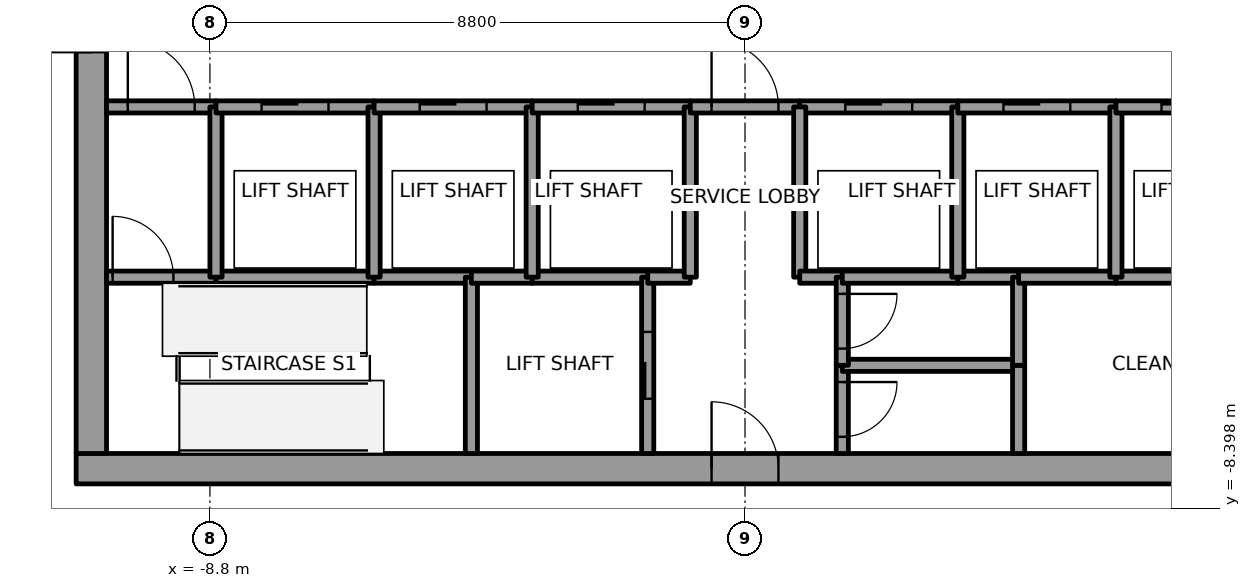
"""IFC4 building model, lengths in metres.
Left out: names, types, materials, properties, quantities, classifications, styles, units other than length and angle.
Written with IfcOpenShell. Run it as: python <this file> out.ifc"""

import sys

from ifc_helpers import new_model, si_unit, direction, frame, frame_2d, origin, place, context, subcontext, project, spatial, rectangle, extrude, element, fill, save


model = new_model("IFC4")
c1 = context("Model", 3, precision=1e-05, world=origin(), true_north=direction((0.0, 1.0)))
c2 = subcontext(c1, "Body", "Model", "MODEL_VIEW")
j1 = project(units=[si_unit("LENGTHUNIT", "METRE"), si_unit("PLANEANGLEUNIT", "RADIAN")], contexts=[c1])
p1 = place(None, origin())
s1 = spatial("IfcSite", under=j1, at=p1, CompositionType="ELEMENT")
p2 = place(p1, origin())
s2 = spatial("IfcBuilding", under=s1, at=p2, CompositionType="ELEMENT")
p3 = place(p2, frame((0.0, 0.0, 243.0)))
s3 = spatial("IfcBuildingStorey", under=s2, at=p3, CompositionType="ELEMENT", Elevation=243.0)
p4 = place(p3, frame((-11.0, -7.75, 0.0), z_axis=(0.0, 0.0, 1.0), x_axis=(1.0, 0.0, 0.0)))
e1 = element("IfcWall", 1, at=p4, inside=s3, PredefinedType="SHEAR", context=c2, shape_type="SweptSolid", body=[
    extrude(rectangle(XDim=22.0, YDim=0.5, at=frame_2d((11.0, 0.0))), origin(), (0.0, 0.0, 1.0), 4.0),
])
p5 = place(p4, frame((10.45, 0.0, 0.0)))
e2 = element("IfcOpeningElement", 2, at=p5, cuts=e1, PredefinedType="OPENING", context=c2, shape_type="SweptSolid", body=[
    extrude(rectangle(XDim=1.1, YDim=2.1, at=frame_2d((0.55, 1.05))), frame((0.0, 0.25, 0.0), z_axis=(0.0, -1.0, 0.0), x_axis=(1.0, 0.0, 0.0)), (0.0, 0.0, 1.0), 0.5),
])
p6 = place(p3, frame((-10.75, -7.5, 0.0), z_axis=(0.0, 0.0, 1.0), x_axis=(0.0, 1.0, 0.0)))
e3 = element("IfcWall", 3, at=p6, inside=s3, PredefinedType="SHEAR", context=c2, shape_type="SweptSolid", body=[
    extrude(rectangle(XDim=15.0, YDim=0.5, at=frame_2d((7.5, 0.0))), origin(), (0.0, 0.0, 1.0), 4.0),
])
p7 = place(p6, frame((6.6, 0.0, 0.0)))
e4 = element("IfcOpeningElement", 4, at=p7, cuts=e3, PredefinedType="OPENING", context=c2, shape_type="SweptSolid", body=[
    extrude(rectangle(XDim=1.8, YDim=2.1, at=frame_2d((0.9, 1.05))), frame((0.0, 0.25, 0.0), z_axis=(0.0, -1.0, 0.0), x_axis=(1.0, 0.0, 0.0)), (0.0, 0.0, 1.0), 0.5),
])
p8 = place(p3, frame((-10.5, -4.6, 0.0), z_axis=(0.0, 0.0, 1.0), x_axis=(1.0, 0.0, 0.0)))
e5 = element("IfcWall", 5, at=p8, inside=s3, PredefinedType="SOLIDWALL", context=c2, shape_type="SweptSolid", body=[
    extrude(rectangle(XDim=1.8, YDim=0.2, at=frame_2d((0.9, 0.0))), origin(), (0.0, 0.0, 1.0), 3.85),
])
p9 = place(p8, frame((0.1, 0.0, 0.0)))
e6 = element("IfcOpeningElement", 6, at=p9, cuts=e5, PredefinedType="OPENING", context=c2, shape_type="SweptSolid", body=[
    extrude(rectangle(XDim=1.0, YDim=2.1, at=frame_2d((0.5, 1.05))), frame((0.0, 0.1, 0.0), z_axis=(0.0, -1.0, 0.0), x_axis=(1.0, 0.0, 0.0)), (0.0, 0.0, 1.0), 0.2),
])
p10 = place(p3, frame((-10.5, -1.8, 0.0), z_axis=(0.0, 0.0, 1.0), x_axis=(1.0, 0.0, 0.0)))
e7 = element("IfcWall", 7, at=p10, inside=s3, PredefinedType="SOLIDWALL", context=c2, shape_type="SweptSolid", body=[
    extrude(rectangle(XDim=1.8, YDim=0.2, at=frame_2d((0.9, 0.0))), origin(), (0.0, 0.0, 1.0), 3.85),
])
p11 = place(p10, frame((0.35, 0.0, 0.0)))
e8 = element("IfcOpeningElement", 8, at=p11, cuts=e7, PredefinedType="OPENING", context=c2, shape_type="SweptSolid", body=[
    extrude(rectangle(XDim=1.1, YDim=2.1, at=frame_2d((0.55, 1.05))), frame((0.0, 0.1, 0.0), z_axis=(0.0, -1.0, 0.0), x_axis=(1.0, 0.0, 0.0)), (0.0, 0.0, 1.0), 0.2),
])
p12 = place(p3, frame((-8.7, -4.6, 0.0), z_axis=(0.0, 0.0, 1.0), x_axis=(1.0, 0.0, 0.0)))
e9 = element("IfcWall", 9, at=p12, inside=s3, PredefinedType="SOLIDWALL", context=c2, shape_type="SweptSolid", body=[
    extrude(rectangle(XDim=2.6, YDim=0.2, at=frame_2d((1.3, 0.0))), origin(), (0.0, 0.0, 1.0), 3.85),
])
p13 = place(p3, frame((-8.7, -4.6, 0.0), z_axis=(0.0, 0.0, 1.0), x_axis=(0.0, 1.0, 0.0)))
e10 = element("IfcWall", 10, at=p13, inside=s3, PredefinedType="SOLIDWALL", context=c2, shape_type="SweptSolid", body=[
    extrude(rectangle(XDim=2.8, YDim=0.2, at=frame_2d((1.4, 0.0))), origin(), (0.0, 0.0, 1.0), 3.85),
])
p14 = place(p3, frame((-8.7, -1.8, 0.0), z_axis=(0.0, 0.0, 1.0), x_axis=(1.0, 0.0, 0.0)))
e11 = element("IfcWall", 11, at=p14, inside=s3, PredefinedType="SOLIDWALL", context=c2, shape_type="SweptSolid", body=[
    extrude(rectangle(XDim=2.6, YDim=0.2, at=frame_2d((1.3, 0.0))), origin(), (0.0, 0.0, 1.0), 3.85),
])
p15 = place(p14, frame((0.75, 0.0, 0.0)))
e12 = element("IfcOpeningElement", 12, at=p15, cuts=e11, PredefinedType="OPENING", context=c2, shape_type="SweptSolid", body=[
    extrude(rectangle(XDim=1.1, YDim=2.1, at=frame_2d((0.55, 1.05))), frame((0.0, 0.1, 0.0), z_axis=(0.0, -1.0, 0.0), x_axis=(1.0, 0.0, 0.0)), (0.0, 0.0, 1.0), 0.2),
])
p16 = place(p3, frame((-6.1, -4.6, 0.0), z_axis=(0.0, 0.0, 1.0), x_axis=(1.0, 0.0, 0.0)))
e13 = element("IfcWall", 13, at=p16, inside=s3, PredefinedType="SOLIDWALL", context=c2, shape_type="SweptSolid", body=[
    extrude(rectangle(XDim=1.6, YDim=0.2, at=frame_2d((0.8, 0.0))), origin(), (0.0, 0.0, 1.0), 3.85),
])
p17 = place(p3, frame((-6.1, -4.6, 0.0), z_axis=(0.0, 0.0, 1.0), x_axis=(0.0, 1.0, 0.0)))
e14 = element("IfcWall", 14, at=p17, inside=s3, PredefinedType="SOLIDWALL", context=c2, shape_type="SweptSolid", body=[
    extrude(rectangle(XDim=2.8, YDim=0.2, at=frame_2d((1.4, 0.0))), origin(), (0.0, 0.0, 1.0), 3.85),
])
p18 = place(p3, frame((-6.1, -1.8, 0.0), z_axis=(0.0, 0.0, 1.0), x_axis=(1.0, 0.0, 0.0)))
e15 = element("IfcWall", 15, at=p18, inside=s3, PredefinedType="SOLIDWALL", context=c2, shape_type="SweptSolid", body=[
    extrude(rectangle(XDim=2.6, YDim=0.2, at=frame_2d((1.3, 0.0))), origin(), (0.0, 0.0, 1.0), 3.85),
])
p19 = place(p18, frame((0.75, 0.0, 0.0)))
e16 = element("IfcOpeningElement", 16, at=p19, cuts=e15, PredefinedType="OPENING", context=c2, shape_type="SweptSolid", body=[
    extrude(rectangle(XDim=1.1, YDim=2.1, at=frame_2d((0.55, 1.05))), frame((0.0, 0.1, 0.0), z_axis=(0.0, -1.0, 0.0), x_axis=(1.0, 0.0, 0.0)), (0.0, 0.0, 1.0), 0.2),
])
p20 = place(p3, frame((-4.5, -4.6, 0.0), z_axis=(0.0, 0.0, 1.0), x_axis=(0.0, -1.0, 0.0)))
e17 = element("IfcWall", 17, at=p20, inside=s3, PredefinedType="SOLIDWALL", context=c2, shape_type="SweptSolid", body=[
    extrude(rectangle(XDim=2.9, YDim=0.2, at=frame_2d((1.45, 0.0))), origin(), (0.0, 0.0, 1.0), 3.85),
])
p21 = place(p3, frame((-4.5, -4.6, 0.0), z_axis=(0.0, 0.0, 1.0), x_axis=(1.0, 0.0, 0.0)))
e18 = element("IfcWall", 18, at=p21, inside=s3, PredefinedType="SOLIDWALL", context=c2, shape_type="SweptSolid", body=[
    extrude(rectangle(XDim=1.0, YDim=0.2, at=frame_2d((0.5, 0.0))), origin(), (0.0, 0.0, 1.0), 3.85),
])
p22 = place(p3, frame((-3.5, -4.6, 0.0), z_axis=(0.0, 0.0, 1.0), x_axis=(1.0, 0.0, 0.0)))
e19 = element("IfcWall", 19, at=p22, inside=s3, PredefinedType="SOLIDWALL", context=c2, shape_type="SweptSolid", body=[
    extrude(rectangle(XDim=1.9, YDim=0.2, at=frame_2d((0.95, 0.0))), origin(), (0.0, 0.0, 1.0), 3.85),
])
p23 = place(p3, frame((-3.5, -4.6, 0.0), z_axis=(0.0, 0.0, 1.0), x_axis=(0.0, 1.0, 0.0)))
e20 = element("IfcWall", 20, at=p23, inside=s3, PredefinedType="SOLIDWALL", context=c2, shape_type="SweptSolid", body=[
    extrude(rectangle(XDim=2.8, YDim=0.2, at=frame_2d((1.4, 0.0))), origin(), (0.0, 0.0, 1.0), 3.85),
])
p24 = place(p3, frame((-3.5, -1.8, 0.0), z_axis=(0.0, 0.0, 1.0), x_axis=(1.0, 0.0, 0.0)))
e21 = element("IfcWall", 21, at=p24, inside=s3, PredefinedType="SOLIDWALL", context=c2, shape_type="SweptSolid", body=[
    extrude(rectangle(XDim=2.6, YDim=0.2, at=frame_2d((1.3, 0.0))), origin(), (0.0, 0.0, 1.0), 3.85),
])
p25 = place(p24, frame((0.75, 0.0, 0.0)))
e22 = element("IfcOpeningElement", 22, at=p25, cuts=e21, PredefinedType="OPENING", context=c2, shape_type="SweptSolid", body=[
    extrude(rectangle(XDim=1.1, YDim=2.1, at=frame_2d((0.55, 1.05))), frame((0.0, 0.1, 0.0), z_axis=(0.0, -1.0, 0.0), x_axis=(1.0, 0.0, 0.0)), (0.0, 0.0, 1.0), 0.2),
])
p26 = place(p3, frame((-1.6, -7.5, 0.0), z_axis=(0.0, 0.0, 1.0), x_axis=(0.0, 1.0, 0.0)))
e23 = element("IfcWall", 23, at=p26, inside=s3, PredefinedType="SOLIDWALL", context=c2, shape_type="SweptSolid", body=[
    extrude(rectangle(XDim=2.9, YDim=0.2, at=frame_2d((1.45, 0.0))), origin(), (0.0, 0.0, 1.0), 3.85),
])
p27 = place(p26, frame((0.9, 0.0, 0.0)))
e24 = element("IfcOpeningElement", 24, at=p27, cuts=e23, PredefinedType="OPENING", context=c2, shape_type="SweptSolid", body=[
    extrude(rectangle(XDim=1.1, YDim=2.1, at=frame_2d((0.55, 1.05))), frame((0.0, 0.1, 0.0), z_axis=(0.0, -1.0, 0.0), x_axis=(1.0, 0.0, 0.0)), (0.0, 0.0, 1.0), 0.2),
])
p28 = place(p3, frame((-1.6, -4.6, 0.0), z_axis=(0.0, 0.0, 1.0), x_axis=(1.0, 0.0, 0.0)))
e25 = element("IfcWall", 25, at=p28, inside=s3, PredefinedType="SOLIDWALL", context=c2, shape_type="SweptSolid", body=[
    extrude(rectangle(XDim=0.7, YDim=0.2, at=frame_2d((0.35, 0.0))), origin(), (0.0, 0.0, 1.0), 3.85),
])
p29 = place(p3, frame((-0.9, -4.6, 0.0), z_axis=(0.0, 0.0, 1.0), x_axis=(0.0, 1.0, 0.0)))
e26 = element("IfcWall", 26, at=p29, inside=s3, PredefinedType="SOLIDWALL", context=c2, shape_type="SweptSolid", body=[
    extrude(rectangle(XDim=2.8, YDim=0.2, at=frame_2d((1.4, 0.0))), origin(), (0.0, 0.0, 1.0), 3.85),
])
p30 = place(p3, frame((-0.9, -1.8, 0.0), z_axis=(0.0, 0.0, 1.0), x_axis=(1.0, 0.0, 0.0)))
e27 = element("IfcWall", 27, at=p30, inside=s3, PredefinedType="SOLIDWALL", context=c2, shape_type="SweptSolid", body=[
    extrude(rectangle(XDim=1.8, YDim=0.2, at=frame_2d((0.9, 0.0))), origin(), (0.0, 0.0, 1.0), 3.85),
])
p31 = place(p30, frame((0.35, 0.0, 0.0)))
e28 = element("IfcOpeningElement", 28, at=p31, cuts=e27, PredefinedType="OPENING", context=c2, shape_type="SweptSolid", body=[
    extrude(rectangle(XDim=1.1, YDim=2.1, at=frame_2d((0.55, 1.05))), frame((0.0, 0.1, 0.0), z_axis=(0.0, -1.0, 0.0), x_axis=(1.0, 0.0, 0.0)), (0.0, 0.0, 1.0), 0.2),
])
p32 = place(p3, frame((0.9, -1.8, 0.0), z_axis=(0.0, 0.0, 1.0), x_axis=(1.0, 0.0, 0.0)))
e29 = element("IfcWall", 29, at=p32, inside=s3, PredefinedType="SOLIDWALL", context=c2, shape_type="SweptSolid", body=[
    extrude(rectangle(XDim=2.6, YDim=0.2, at=frame_2d((1.3, 0.0))), origin(), (0.0, 0.0, 1.0), 3.85),
])
p33 = place(p32, frame((0.75, 0.0, 0.0)))
e30 = element("IfcOpeningElement", 30, at=p33, cuts=e29, PredefinedType="OPENING", context=c2, shape_type="SweptSolid", body=[
    extrude(rectangle(XDim=1.1, YDim=2.1, at=frame_2d((0.55, 1.05))), frame((0.0, 0.1, 0.0), z_axis=(0.0, -1.0, 0.0), x_axis=(1.0, 0.0, 0.0)), (0.0, 0.0, 1.0), 0.2),
])
p34 = place(p3, frame((0.9, -1.8, 0.0), z_axis=(0.0, 0.0, 1.0), x_axis=(0.0, -1.0, 0.0)))
e31 = element("IfcWall", 31, at=p34, inside=s3, PredefinedType="SOLIDWALL", context=c2, shape_type="SweptSolid", body=[
    extrude(rectangle(XDim=2.8, YDim=0.2, at=frame_2d((1.4, 0.0))), origin(), (0.0, 0.0, 1.0), 3.85),
])
p35 = place(p3, frame((0.9, -4.6, 0.0), z_axis=(0.0, 0.0, 1.0), x_axis=(1.0, 0.0, 0.0)))
e32 = element("IfcWall", 32, at=p35, inside=s3, PredefinedType="SOLIDWALL", context=c2, shape_type="SweptSolid", body=[
    extrude(rectangle(XDim=0.7, YDim=0.2, at=frame_2d((0.35, 0.0))), origin(), (0.0, 0.0, 1.0), 3.85),
])
p36 = place(p3, frame((1.6, -6.05, 0.0), z_axis=(0.0, 0.0, 1.0), x_axis=(0.0, -1.0, 0.0)))
e33 = element("IfcWall", 33, at=p36, inside=s3, PredefinedType="SOLIDWALL", context=c2, shape_type="SweptSolid", body=[
    extrude(rectangle(XDim=1.45, YDim=0.2, at=frame_2d((0.725, 0.0))), origin(), (0.0, 0.0, 1.0), 3.85),
])
p37 = place(p36, frame((0.275, 0.0, 0.0)))
e34 = element("IfcOpeningElement", 34, at=p37, cuts=e33, PredefinedType="OPENING", context=c2, shape_type="SweptSolid", body=[
    extrude(rectangle(XDim=0.9, YDim=2.1, at=frame_2d((0.45, 1.05))), frame((0.0, 0.1, 0.0), z_axis=(0.0, -1.0, 0.0), x_axis=(1.0, 0.0, 0.0)), (0.0, 0.0, 1.0), 0.2),
])
p38 = place(p3, frame((4.5, -6.05, 0.0), z_axis=(0.0, 0.0, 1.0), x_axis=(-1.0, 0.0, 0.0)))
e35 = element("IfcWall", 35, at=p38, inside=s3, PredefinedType="SOLIDWALL", context=c2, shape_type="SweptSolid", body=[
    extrude(rectangle(XDim=2.9, YDim=0.2, at=frame_2d((1.45, 0.0))), origin(), (0.0, 0.0, 1.0), 3.85),
])
p39 = place(p3, frame((1.6, -4.6, 0.0), z_axis=(0.0, 0.0, 1.0), x_axis=(0.0, -1.0, 0.0)))
e36 = element("IfcWall", 36, at=p39, inside=s3, PredefinedType="SOLIDWALL", context=c2, shape_type="SweptSolid", body=[
    extrude(rectangle(XDim=1.45, YDim=0.2, at=frame_2d((0.725, 0.0))), origin(), (0.0, 0.0, 1.0), 3.85),
])
p40 = place(p39, frame((0.275, 0.0, 0.0)))
e37 = element("IfcOpeningElement", 37, at=p40, cuts=e36, PredefinedType="OPENING", context=c2, shape_type="SweptSolid", body=[
    extrude(rectangle(XDim=0.9, YDim=2.1, at=frame_2d((0.45, 1.05))), frame((0.0, 0.1, 0.0), z_axis=(0.0, -1.0, 0.0), x_axis=(1.0, 0.0, 0.0)), (0.0, 0.0, 1.0), 0.2),
])
p41 = place(p3, frame((3.5, -4.6, 0.0), z_axis=(0.0, 0.0, 1.0), x_axis=(-1.0, 0.0, 0.0)))
e38 = element("IfcWall", 38, at=p41, inside=s3, PredefinedType="SOLIDWALL", context=c2, shape_type="SweptSolid", body=[
    extrude(rectangle(XDim=1.9, YDim=0.2, at=frame_2d((0.95, 0.0))), origin(), (0.0, 0.0, 1.0), 3.85),
])
p42 = place(p3, frame((4.5, -4.6, 0.0), z_axis=(0.0, 0.0, 1.0), x_axis=(-1.0, 0.0, 0.0)))
e39 = element("IfcWall", 39, at=p42, inside=s3, PredefinedType="SOLIDWALL", context=c2, shape_type="SweptSolid", body=[
    extrude(rectangle(XDim=1.0, YDim=0.2, at=frame_2d((0.5, 0.0))), origin(), (0.0, 0.0, 1.0), 3.85),
])
p43 = place(p3, frame((3.5, -4.6, 0.0), z_axis=(0.0, 0.0, 1.0), x_axis=(0.0, 1.0, 0.0)))
e40 = element("IfcWall", 40, at=p43, inside=s3, PredefinedType="SOLIDWALL", context=c2, shape_type="SweptSolid", body=[
    extrude(rectangle(XDim=2.8, YDim=0.2, at=frame_2d((1.4, 0.0))), origin(), (0.0, 0.0, 1.0), 3.85),
])
p44 = place(p3, frame((3.5, -1.8, 0.0), z_axis=(0.0, 0.0, 1.0), x_axis=(1.0, 0.0, 0.0)))
e41 = element("IfcWall", 41, at=p44, inside=s3, PredefinedType="SOLIDWALL", context=c2, shape_type="SweptSolid", body=[
    extrude(rectangle(XDim=2.6, YDim=0.2, at=frame_2d((1.3, 0.0))), origin(), (0.0, 0.0, 1.0), 3.85),
])
p45 = place(p44, frame((0.75, 0.0, 0.0)))
e42 = element("IfcOpeningElement", 42, at=p45, cuts=e41, PredefinedType="OPENING", context=c2, shape_type="SweptSolid", body=[
    extrude(rectangle(XDim=1.1, YDim=2.1, at=frame_2d((0.55, 1.05))), frame((0.0, 0.1, 0.0), z_axis=(0.0, -1.0, 0.0), x_axis=(1.0, 0.0, 0.0)), (0.0, 0.0, 1.0), 0.2),
])
for number, where, z_axis, x_axis in (
    (43, (4.5, -6.05, 0.0), (0.0, 0.0, 1.0), (0.0, -1.0, 0.0)),
    (44, (4.5, -4.6, 0.0), (0.0, 0.0, 1.0), (0.0, -1.0, 0.0)),
):
    element("IfcWall", number, at=place(p3, frame(where, z_axis=z_axis, x_axis=x_axis)), inside=s3, PredefinedType="SOLIDWALL", context=c2, shape_type="SweptSolid", body=[
        extrude(rectangle(XDim=1.45, YDim=0.2, at=frame_2d((0.725, 0.0))), origin(), (0.0, 0.0, 1.0), 3.85),
    ])
p46 = place(p3, frame((6.1, -4.6, 0.0), z_axis=(0.0, 0.0, 1.0), x_axis=(-1.0, 0.0, 0.0)))
e45 = element("IfcWall", 45, at=p46, inside=s3, PredefinedType="SOLIDWALL", context=c2, shape_type="SweptSolid", body=[
    extrude(rectangle(XDim=1.6, YDim=0.2, at=frame_2d((0.8, 0.0))), origin(), (0.0, 0.0, 1.0), 3.85),
])
p47 = place(p3, frame((8.7, -4.6, 0.0), z_axis=(0.0, 0.0, 1.0), x_axis=(-1.0, 0.0, 0.0)))
e46 = element("IfcWall", 46, at=p47, inside=s3, PredefinedType="SOLIDWALL", context=c2, shape_type="SweptSolid", body=[
    extrude(rectangle(XDim=2.6, YDim=0.2, at=frame_2d((1.3, 0.0))), origin(), (0.0, 0.0, 1.0), 3.85),
])
p48 = place(p3, frame((6.1, -4.6, 0.0), z_axis=(0.0, 0.0, 1.0), x_axis=(0.0, 1.0, 0.0)))
e47 = element("IfcWall", 47, at=p48, inside=s3, PredefinedType="SOLIDWALL", context=c2, shape_type="SweptSolid", body=[
    extrude(rectangle(XDim=2.8, YDim=0.2, at=frame_2d((1.4, 0.0))), origin(), (0.0, 0.0, 1.0), 3.85),
])
p49 = place(p3, frame((6.1, -1.8, 0.0), z_axis=(0.0, 0.0, 1.0), x_axis=(1.0, 0.0, 0.0)))
e48 = element("IfcWall", 48, at=p49, inside=s3, PredefinedType="SOLIDWALL", context=c2, shape_type="SweptSolid", body=[
    extrude(rectangle(XDim=2.6, YDim=0.2, at=frame_2d((1.3, 0.0))), origin(), (0.0, 0.0, 1.0), 3.85),
])
p50 = place(p49, frame((0.75, 0.0, 0.0)))
e49 = element("IfcOpeningElement", 49, at=p50, cuts=e48, PredefinedType="OPENING", context=c2, shape_type="SweptSolid", body=[
    extrude(rectangle(XDim=1.1, YDim=2.1, at=frame_2d((0.55, 1.05))), frame((0.0, 0.1, 0.0), z_axis=(0.0, -1.0, 0.0), x_axis=(1.0, 0.0, 0.0)), (0.0, 0.0, 1.0), 0.2),
])
p51 = place(p15, origin())
e50 = element("IfcDoor", 50, at=p51, inside=s3, OperationType="SLIDING_TO_RIGHT", PredefinedType="DOOR", context=c2, shape_type="SweptSolid", body=[
    extrude(rectangle(XDim=1.1, YDim=2.1, at=frame_2d((0.55, 1.05))), frame((0.0, 0.025, 0.0), z_axis=(0.0, -1.0, 0.0), x_axis=(1.0, 0.0, 0.0)), (0.0, 0.0, 1.0), 0.05),
])
fill(e12, e50)
p52 = place(p19, origin())
e51 = element("IfcDoor", 51, at=p52, inside=s3, OperationType="SLIDING_TO_RIGHT", PredefinedType="DOOR", context=c2, shape_type="SweptSolid", body=[
    extrude(rectangle(XDim=1.1, YDim=2.1, at=frame_2d((0.55, 1.05))), frame((0.0, 0.025, 0.0), z_axis=(0.0, -1.0, 0.0), x_axis=(1.0, 0.0, 0.0)), (0.0, 0.0, 1.0), 0.05),
])
fill(e16, e51)
p53 = place(p25, origin())
e52 = element("IfcDoor", 52, at=p53, inside=s3, OperationType="SLIDING_TO_RIGHT", PredefinedType="DOOR", context=c2, shape_type="SweptSolid", body=[
    extrude(rectangle(XDim=1.1, YDim=2.1, at=frame_2d((0.55, 1.05))), frame((0.0, 0.025, 0.0), z_axis=(0.0, -1.0, 0.0), x_axis=(1.0, 0.0, 0.0)), (0.0, 0.0, 1.0), 0.05),
])
fill(e22, e52)
p54 = place(p33, origin())
e53 = element("IfcDoor", 53, at=p54, inside=s3, OperationType="SLIDING_TO_LEFT", PredefinedType="DOOR", context=c2, shape_type="SweptSolid", body=[
    extrude(rectangle(XDim=1.1, YDim=2.1, at=frame_2d((0.55, 1.05))), frame((0.0, 0.025, 0.0), z_axis=(0.0, -1.0, 0.0), x_axis=(1.0, 0.0, 0.0)), (0.0, 0.0, 1.0), 0.05),
])
fill(e30, e53)
p55 = place(p45, origin())
e54 = element("IfcDoor", 54, at=p55, inside=s3, OperationType="SLIDING_TO_LEFT", PredefinedType="DOOR", context=c2, shape_type="SweptSolid", body=[
    extrude(rectangle(XDim=1.1, YDim=2.1, at=frame_2d((0.55, 1.05))), frame((0.0, 0.025, 0.0), z_axis=(0.0, -1.0, 0.0), x_axis=(1.0, 0.0, 0.0)), (0.0, 0.0, 1.0), 0.05),
])
fill(e42, e54)
p56 = place(p50, origin())
e55 = element("IfcDoor", 55, at=p56, inside=s3, OperationType="SLIDING_TO_RIGHT", PredefinedType="DOOR", context=c2, shape_type="SweptSolid", body=[
    extrude(rectangle(XDim=1.1, YDim=2.1, at=frame_2d((0.55, 1.05))), frame((0.0, 0.025, 0.0), z_axis=(0.0, -1.0, 0.0), x_axis=(1.0, 0.0, 0.0)), (0.0, 0.0, 1.0), 0.05),
])
fill(e49, e55)
p57 = place(p27, origin())
e56 = element("IfcDoor", 56, at=p57, inside=s3, OperationType="SLIDING_TO_RIGHT", PredefinedType="DOOR", context=c2, shape_type="SweptSolid", body=[
    extrude(rectangle(XDim=1.1, YDim=2.1, at=frame_2d((0.55, 1.05))), frame((0.0, 0.025, 0.0), z_axis=(0.0, -1.0, 0.0), x_axis=(1.0, 0.0, 0.0)), (0.0, 0.0, 1.0), 0.05),
])
fill(e24, e56)
p58 = place(p11, origin())
e57 = element("IfcDoor", 57, at=p58, inside=s3, OperationType="SINGLE_SWING_RIGHT", PredefinedType="DOOR", context=c2, shape_type="SweptSolid", body=[
    extrude(rectangle(XDim=1.1, YDim=2.1, at=frame_2d((0.55, 1.05))), frame((0.0, 0.025, 0.0), z_axis=(0.0, -1.0, 0.0), x_axis=(1.0, 0.0, 0.0)), (0.0, 0.0, 1.0), 0.05),
])
fill(e8, e57)
p59 = place(p31, origin())
e58 = element("IfcDoor", 58, at=p59, inside=s3, OperationType="SINGLE_SWING_LEFT", PredefinedType="DOOR", context=c2, shape_type="SweptSolid", body=[
    extrude(rectangle(XDim=1.1, YDim=2.1, at=frame_2d((0.55, 1.05))), frame((0.0, 0.025, 0.0), z_axis=(0.0, -1.0, 0.0), x_axis=(1.0, 0.0, 0.0)), (0.0, 0.0, 1.0), 0.05),
])
fill(e28, e58)
p60 = place(p9, origin())
e59 = element("IfcDoor", 59, at=p60, inside=s3, OperationType="SINGLE_SWING_LEFT", PredefinedType="DOOR", context=c2, shape_type="SweptSolid", body=[
    extrude(rectangle(XDim=1.0, YDim=2.1, at=frame_2d((0.5, 1.05))), frame((0.0, 0.025, 0.0), z_axis=(0.0, -1.0, 0.0), x_axis=(1.0, 0.0, 0.0)), (0.0, 0.0, 1.0), 0.05),
])
fill(e6, e59)
p61 = place(p37, origin())
e60 = element("IfcDoor", 60, at=p61, inside=s3, OperationType="SINGLE_SWING_LEFT", PredefinedType="DOOR", context=c2, shape_type="SweptSolid", body=[
    extrude(rectangle(XDim=0.9, YDim=2.1, at=frame_2d((0.45, 1.05))), frame((0.0, 0.025, 0.0), z_axis=(0.0, -1.0, 0.0), x_axis=(1.0, 0.0, 0.0)), (0.0, 0.0, 1.0), 0.05),
])
fill(e34, e60)
p62 = place(p40, origin())
e61 = element("IfcDoor", 61, at=p62, inside=s3, OperationType="SINGLE_SWING_RIGHT", PredefinedType="DOOR", context=c2, shape_type="SweptSolid", body=[
    extrude(rectangle(XDim=0.9, YDim=2.1, at=frame_2d((0.45, 1.05))), frame((0.0, 0.025, 0.0), z_axis=(0.0, -1.0, 0.0), x_axis=(1.0, 0.0, 0.0)), (0.0, 0.0, 1.0), 0.05),
])
fill(e37, e61)
p63 = place(p7, origin())
e62 = element("IfcDoor", 62, at=p63, inside=s3, OperationType="DOUBLE_DOOR_SINGLE_SWING", PredefinedType="DOOR", context=c2, shape_type="SweptSolid", body=[
    extrude(rectangle(XDim=1.8, YDim=2.1, at=frame_2d((0.9, 1.05))), frame((0.0, 0.025, 0.0), z_axis=(0.0, -1.0, 0.0), x_axis=(1.0, 0.0, 0.0)), (0.0, 0.0, 1.0), 0.05),
])
fill(e4, e62)
p64 = place(p5, origin())
e63 = element("IfcDoor", 63, at=p64, inside=s3, OperationType="SINGLE_SWING_LEFT", PredefinedType="DOOR", context=c2, shape_type="SweptSolid", body=[
    extrude(rectangle(XDim=1.1, YDim=2.1, at=frame_2d((0.55, 1.05))), frame((0.0, 0.025, 0.0), z_axis=(0.0, -1.0, 0.0), x_axis=(1.0, 0.0, 0.0)), (0.0, 0.0, 1.0), 0.05),
])
fill(e2, e63)
save(model, sys.argv[1])
